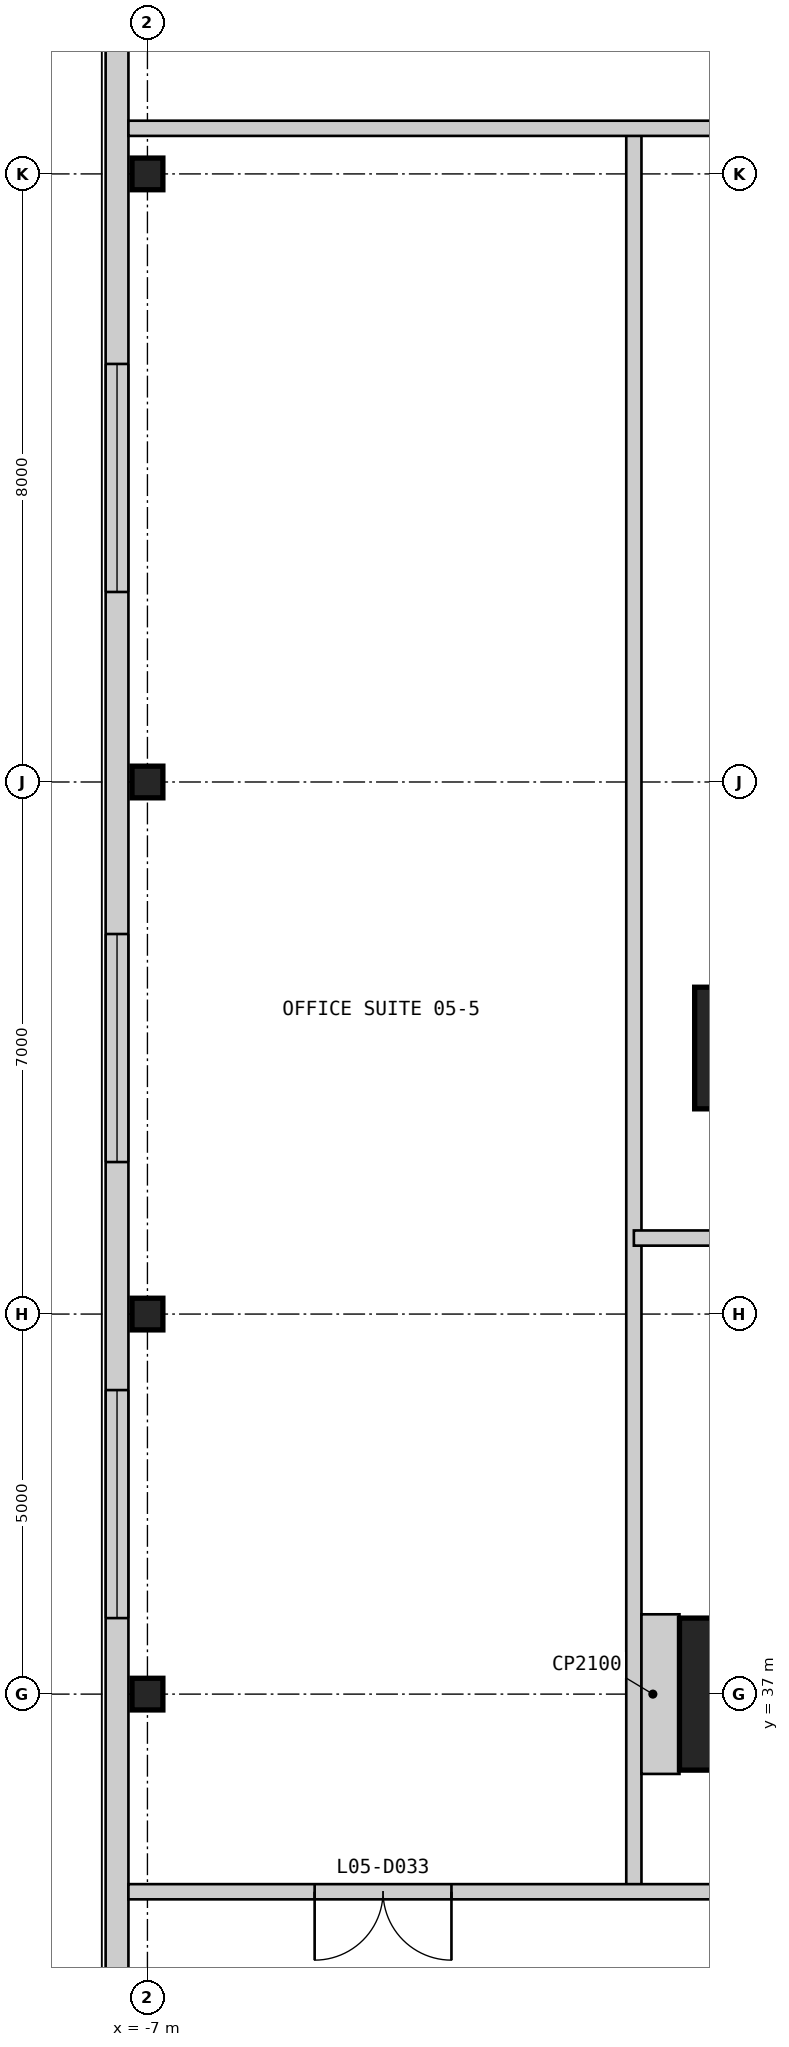
"""IFC4 building model, lengths in metres.
Left out: names, types, materials, properties, quantities, classifications, styles, units other than length and angle.
Written with IfcOpenShell. Run it as: python <this file> out.ifc"""

import sys

from ifc_helpers import new_model, si_unit, direction, frame, frame_2d, origin, origin_2d, place, context, subcontext, project, spatial, rectangle, i_section, extrude, element, fill, save


model = new_model("IFC4")
c1 = context("Model", 3, precision=1e-05, world=origin(), true_north=direction((0.0, 1.0)))
c2 = subcontext(c1, "Body", "Model", "MODEL_VIEW")
j1 = project(units=[si_unit("LENGTHUNIT", "METRE"), si_unit("PLANEANGLEUNIT", "RADIAN")], contexts=[c1])
p1 = place(None, origin())
s1 = spatial("IfcSite", under=j1, at=p1, CompositionType="ELEMENT")
p2 = place(p1, origin())
s2 = spatial("IfcBuilding", under=s1, at=p2, CompositionType="ELEMENT")
p3 = place(p2, frame((0.0, 0.0, 26.2)))
s3 = spatial("IfcBuildingStorey", under=s2, at=p3, CompositionType="ELEMENT", Elevation=26.2)
p4 = place(p3, frame((1.0, 45.5, 0.0), z_axis=(0.0, 0.0, 1.0), x_axis=(1.0, 0.0, 0.0)))
e1 = element("IfcColumn", 1, at=p4, inside=s3, PredefinedType="COLUMN", context=c2, shape_type="SweptSolid", body=[
    extrude(rectangle(XDim=1.6, YDim=1.6, at=origin_2d()), origin(), (0.0, 0.0, 1.0), 4.8),
])
p5 = place(p3, frame((1.0, 37.0, 0.0), z_axis=(0.0, 0.0, 1.0), x_axis=(1.0, 0.0, 0.0)))
e2 = element("IfcColumn", 2, at=p5, inside=s3, PredefinedType="COLUMN", context=c2, shape_type="SweptSolid", body=[
    extrude(rectangle(XDim=2.0, YDim=2.0, at=origin_2d()), origin(), (0.0, 0.0, 1.0), 4.8),
])
for number, where, z_axis, x_axis in (
    (3, (-7.0, 37.0, 0.0), (0.0, 0.0, 1.0), (1.0, 0.0, 0.0)),
    (4, (-7.0, 42.0, 0.0), (0.0, 0.0, 1.0), (1.0, 0.0, 0.0)),
    (5, (-7.0, 49.0, 0.0), (0.0, 0.0, 1.0), (1.0, 0.0, 0.0)),
    (6, (-7.0, 57.0, 0.0), (0.0, 0.0, 1.0), (1.0, 0.0, 0.0)),
):
    element("IfcColumn", number, at=place(p3, frame(where, z_axis=z_axis, x_axis=x_axis)), inside=s3, PredefinedType="COLUMN", context=c2, shape_type="SweptSolid", body=[
        extrude(i_section(OverallWidth=0.406, OverallDepth=0.417, WebThickness=0.03, FlangeThickness=0.048, at=origin_2d()), origin(), (0.0, 0.0, 1.0), 4.8),
    ])
p6 = place(p3, frame((-7.4, 65.25, 0.0), z_axis=(0.0, 0.0, 1.0), x_axis=(0.0, -1.0, 0.0)))
e7 = element("IfcWall", 7, at=p6, inside=s3, PredefinedType="SOLIDWALL", context=c2, shape_type="SweptSolid", body=[
    extrude(rectangle(XDim=72.5, YDim=0.3, at=frame_2d((36.25, 0.0))), origin(), (0.0, 0.0, 1.0), 4.5),
])
p7 = place(p6, frame((66.75, 0.0, 0.9)))
e8 = element("IfcOpeningElement", 8, at=p7, cuts=e7, PredefinedType="OPENING", context=c2, shape_type="SweptSolid", body=[
    extrude(rectangle(XDim=3.0, YDim=2.4, at=frame_2d((1.5, 1.2))), frame((0.0, 0.16, 0.0), z_axis=(0.0, -1.0, 0.0), x_axis=(1.0, 0.0, 0.0)), (0.0, 0.0, 1.0), 0.32),
])
p8 = place(p6, frame((58.75, 0.0, 0.9)))
e9 = element("IfcOpeningElement", 9, at=p8, cuts=e7, PredefinedType="OPENING", context=c2, shape_type="SweptSolid", body=[
    extrude(rectangle(XDim=3.0, YDim=2.4, at=frame_2d((1.5, 1.2))), frame((0.0, 0.16, 0.0), z_axis=(0.0, -1.0, 0.0), x_axis=(1.0, 0.0, 0.0)), (0.0, 0.0, 1.0), 0.32),
])
p9 = place(p6, frame((44.75, 0.0, 0.9)))
e10 = element("IfcOpeningElement", 10, at=p9, cuts=e7, PredefinedType="OPENING", context=c2, shape_type="SweptSolid", body=[
    extrude(rectangle(XDim=3.0, YDim=2.4, at=frame_2d((1.5, 1.2))), frame((0.0, 0.16, 0.0), z_axis=(0.0, -1.0, 0.0), x_axis=(1.0, 0.0, 0.0)), (0.0, 0.0, 1.0), 0.32),
])
p10 = place(p6, frame((32.75, 0.0, 0.9)))
e11 = element("IfcOpeningElement", 11, at=p10, cuts=e7, PredefinedType="OPENING", context=c2, shape_type="SweptSolid", body=[
    extrude(rectangle(XDim=3.0, YDim=2.4, at=frame_2d((1.5, 1.2))), frame((0.0, 0.16, 0.0), z_axis=(0.0, -1.0, 0.0), x_axis=(1.0, 0.0, 0.0)), (0.0, 0.0, 1.0), 0.32),
])
p11 = place(p6, frame((24.25, 0.0, 0.9)))
e12 = element("IfcOpeningElement", 12, at=p11, cuts=e7, PredefinedType="OPENING", context=c2, shape_type="SweptSolid", body=[
    extrude(rectangle(XDim=3.0, YDim=2.4, at=frame_2d((1.5, 1.2))), frame((0.0, 0.16, 0.0), z_axis=(0.0, -1.0, 0.0), x_axis=(1.0, 0.0, 0.0)), (0.0, 0.0, 1.0), 0.32),
])
p12 = place(p6, frame((18.25, 0.0, 0.9)))
e13 = element("IfcOpeningElement", 13, at=p12, cuts=e7, PredefinedType="OPENING", context=c2, shape_type="SweptSolid", body=[
    extrude(rectangle(XDim=3.0, YDim=2.4, at=frame_2d((1.5, 1.2))), frame((0.0, 0.16, 0.0), z_axis=(0.0, -1.0, 0.0), x_axis=(1.0, 0.0, 0.0)), (0.0, 0.0, 1.0), 0.32),
])
p13 = place(p6, frame((10.75, 0.0, 0.9)))
e14 = element("IfcOpeningElement", 14, at=p13, cuts=e7, PredefinedType="OPENING", context=c2, shape_type="SweptSolid", body=[
    extrude(rectangle(XDim=3.0, YDim=2.4, at=frame_2d((1.5, 1.2))), frame((0.0, 0.16, 0.0), z_axis=(0.0, -1.0, 0.0), x_axis=(1.0, 0.0, 0.0)), (0.0, 0.0, 1.0), 0.32),
])
p14 = place(p6, frame((2.75, 0.0, 0.9)))
e15 = element("IfcOpeningElement", 15, at=p14, cuts=e7, PredefinedType="OPENING", context=c2, shape_type="SweptSolid", body=[
    extrude(rectangle(XDim=3.0, YDim=2.4, at=frame_2d((1.5, 1.2))), frame((0.0, 0.16, 0.0), z_axis=(0.0, -1.0, 0.0), x_axis=(1.0, 0.0, 0.0)), (0.0, 0.0, 1.0), 0.32),
])
p15 = place(p3, frame((-0.6, 34.4, 0.0), z_axis=(0.0, 0.0, 1.0), x_axis=(0.0, 1.0, 0.0)))
e16 = element("IfcWall", 16, at=p15, inside=s3, PredefinedType="PARTITIONING", context=c2, shape_type="SweptSolid", body=[
    extrude(rectangle(XDim=23.2, YDim=0.2, at=frame_2d((11.6, 0.0))), origin(), (0.0, 0.0, 1.0), 4.5),
])
p16 = place(p3, frame((-7.25, 34.4, 0.0), z_axis=(0.0, 0.0, 1.0), x_axis=(1.0, 0.0, 0.0)))
e17 = element("IfcWall", 17, at=p16, inside=s3, PredefinedType="PARTITIONING", context=c2, shape_type="SweptSolid", body=[
    extrude(rectangle(XDim=14.25, YDim=0.2, at=frame_2d((7.125, 0.0))), origin(), (0.0, 0.0, 1.0), 4.5),
])
p17 = place(p16, frame((9.525, 0.0, 0.0)))
e18 = element("IfcOpeningElement", 18, at=p17, cuts=e17, PredefinedType="OPENING", context=c2, shape_type="SweptSolid", body=[
    extrude(rectangle(XDim=1.8, YDim=2.4, at=frame_2d((0.9, 1.2))), frame((0.0, 0.11, 0.0), z_axis=(0.0, -1.0, 0.0), x_axis=(1.0, 0.0, 0.0)), (0.0, 0.0, 1.0), 0.22),
])
p18 = place(p16, frame((2.45, 0.0, 0.0)))
e19 = element("IfcOpeningElement", 19, at=p18, cuts=e17, PredefinedType="OPENING", context=c2, shape_type="SweptSolid", body=[
    extrude(rectangle(XDim=1.8, YDim=2.4, at=frame_2d((0.9, 1.2))), frame((0.0, 0.11, 0.0), z_axis=(0.0, -1.0, 0.0), x_axis=(1.0, 0.0, 0.0)), (0.0, 0.0, 1.0), 0.22),
])
p19 = place(p3, frame((-0.6, 43.0, 0.0), z_axis=(0.0, 0.0, 1.0), x_axis=(1.0, 0.0, 0.0)))
e20 = element("IfcWall", 20, at=p19, inside=s3, PredefinedType="PARTITIONING", context=c2, shape_type="SweptSolid", body=[
    extrude(rectangle(XDim=14.6, YDim=0.2, at=frame_2d((7.3, 0.0))), origin(), (0.0, 0.0, 1.0), 4.5),
])
p20 = place(p3, frame((-7.25, 57.6, 0.0), z_axis=(0.0, 0.0, 1.0), x_axis=(1.0, 0.0, 0.0)))
e21 = element("IfcWall", 21, at=p20, inside=s3, PredefinedType="PARTITIONING", context=c2, shape_type="SweptSolid", body=[
    extrude(rectangle(XDim=18.85, YDim=0.2, at=frame_2d((9.425, 0.0))), origin(), (0.0, 0.0, 1.0), 4.5),
])
p21 = place(p3, frame((-0.5, 37.0, 0.0), z_axis=(0.0, 0.0, 1.0), x_axis=(1.0, 0.0, 0.0)))
e22 = element("IfcWall", 22, at=p21, inside=s3, PredefinedType="PARTITIONING", context=c2, shape_type="SweptSolid", body=[
    extrude(rectangle(XDim=0.5, YDim=2.1, at=frame_2d((0.25, 0.0))), origin(), (0.0, 0.0, 1.0), 4.5),
])
p22 = place(p11, origin())
e23 = element("IfcWindow", 23, at=p22, inside=s3, PartitioningType="SINGLE_PANEL", PredefinedType="WINDOW", context=c2, shape_type="SweptSolid", body=[
    extrude(rectangle(XDim=3.0, YDim=2.4, at=frame_2d((1.5, 1.2))), frame((0.0, 0.03, 0.0), z_axis=(0.0, -1.0, 0.0), x_axis=(1.0, 0.0, 0.0)), (0.0, 0.0, 1.0), 0.06),
])
fill(e12, e23)
p23 = place(p12, origin())
e24 = element("IfcWindow", 24, at=p23, inside=s3, PartitioningType="SINGLE_PANEL", PredefinedType="WINDOW", context=c2, shape_type="SweptSolid", body=[
    extrude(rectangle(XDim=3.0, YDim=2.4, at=frame_2d((1.5, 1.2))), frame((0.0, 0.03, 0.0), z_axis=(0.0, -1.0, 0.0), x_axis=(1.0, 0.0, 0.0)), (0.0, 0.0, 1.0), 0.06),
])
fill(e13, e24)
p24 = place(p13, origin())
e25 = element("IfcWindow", 25, at=p24, inside=s3, PartitioningType="SINGLE_PANEL", PredefinedType="WINDOW", context=c2, shape_type="SweptSolid", body=[
    extrude(rectangle(XDim=3.0, YDim=2.4, at=frame_2d((1.5, 1.2))), frame((0.0, 0.03, 0.0), z_axis=(0.0, -1.0, 0.0), x_axis=(1.0, 0.0, 0.0)), (0.0, 0.0, 1.0), 0.06),
])
fill(e14, e25)
p25 = place(p18, frame((1.8, 0.0, 0.0), z_axis=(0.0, 0.0, 1.0), x_axis=(-1.0, 0.0, 0.0)))
e26 = element("IfcDoor", 26, at=p25, inside=s3, OperationType="DOUBLE_DOOR_SINGLE_SWING", PredefinedType="DOOR", context=c2, shape_type="SweptSolid", body=[
    extrude(rectangle(XDim=1.8, YDim=2.4, at=frame_2d((0.9, 1.2))), frame((0.0, 0.025, 0.0), z_axis=(0.0, -1.0, 0.0), x_axis=(1.0, 0.0, 0.0)), (0.0, 0.0, 1.0), 0.05),
])
fill(e19, e26)
save(model, sys.argv[1])
